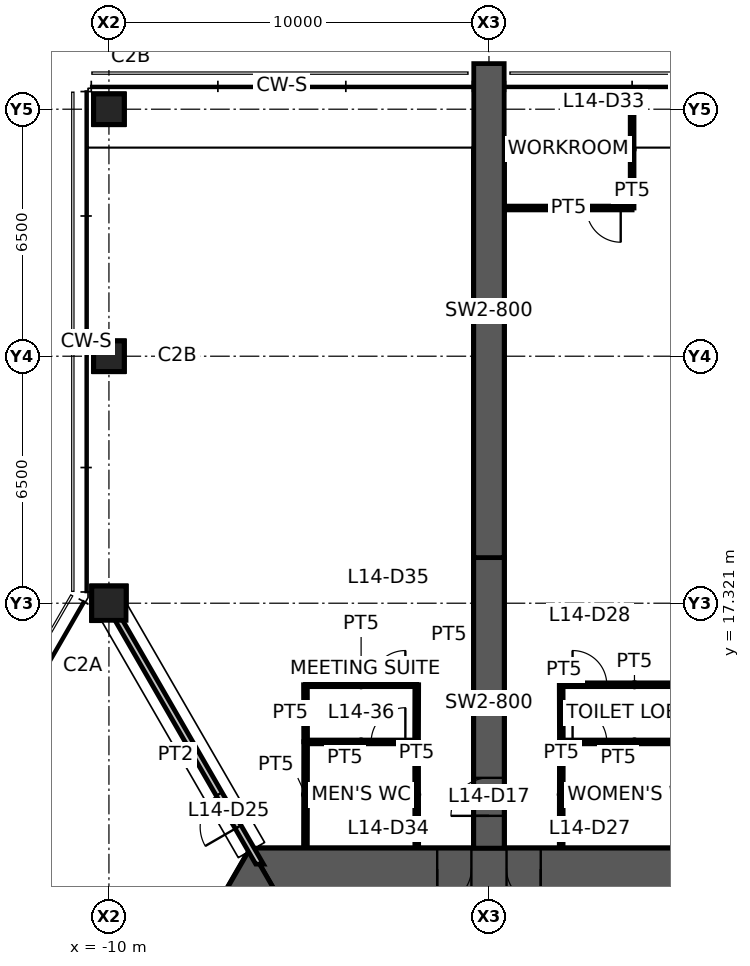
"""IFC4 building model, lengths in metres.
Left out: names, types, materials, properties, quantities, classifications, styles, units other than length and angle.
Written with IfcOpenShell. Run it as: python <this file> out.ifc"""

import sys

from ifc_helpers import new_model, si_unit, direction, frame, frame_2d, origin, origin_2d, place, context, subcontext, project, spatial, polyline, rectangle, hollow_rectangle, outline, extrude, element, fill, save


model = new_model("IFC4")
c1 = context("Model", 3, precision=1e-05, world=origin(), true_north=direction((0.0, 1.0)))
c2 = subcontext(c1, "Body", "Model", "MODEL_VIEW")
j1 = project(units=[si_unit("LENGTHUNIT", "METRE"), si_unit("PLANEANGLEUNIT", "RADIAN")], contexts=[c1])
p1 = place(None, origin())
s1 = spatial("IfcSite", under=j1, at=p1, CompositionType="ELEMENT")
p2 = place(p1, origin())
s2 = spatial("IfcBuilding", under=s1, at=p2, CompositionType="ELEMENT")
p3 = place(p2, frame((0.0, 0.0, 57.0)))
s3 = spatial("IfcBuildingStorey", under=s2, at=p3, CompositionType="ELEMENT", Elevation=57.0)
p4 = place(p3, frame((-10.0, 17.321, 0.0), z_axis=(0.0, 0.0, 1.0), x_axis=(1.0, 0.0, 0.0)))
e1 = element("IfcColumn", 1, at=p4, inside=s3, PredefinedType="COLUMN", context=c2, shape_type="SweptSolid", body=[
    extrude(hollow_rectangle(XDim=0.9, YDim=0.9, WallThickness=0.055, at=origin_2d()), origin(), (0.0, 0.0, 1.0), 4.2),
])
for number, where, z_axis, x_axis in (
    (2, (-10.0, 23.821, 0.0), (0.0, 0.0, 1.0), (1.0, 0.0, 0.0)),
    (3, (-10.0, 30.321, 0.0), (0.0, 0.0, 1.0), (1.0, 0.0, 0.0)),
):
    element("IfcColumn", number, at=place(p3, frame(where, z_axis=z_axis, x_axis=x_axis)), inside=s3, PredefinedType="COLUMN", context=c2, shape_type="SweptSolid", body=[
        extrude(hollow_rectangle(XDim=0.8, YDim=0.8, WallThickness=0.045, at=origin_2d()), origin(), (0.0, 0.0, 1.0), 4.2),
    ])
p5 = place(p3, frame((5.961, 10.325, 0.0), z_axis=(0.0, 0.0, 1.0), x_axis=(-1.0, 0.0, 0.0)))
e4 = element("IfcWall", 4, at=p5, inside=s3, PredefinedType="SHEAR", context=c2, shape_type="SweptSolid", body=[
    extrude(outline(polyline([(-0.318, -0.55), (4.599, -0.55), (5.499, -0.55), (6.424, -0.55), (7.323, -0.55), (12.24, -0.55), (11.605, 0.55), (7.323, 0.55), (6.424, 0.55), (5.499, 0.55), (4.599, 0.55), (0.318, 0.55), (-0.318, -0.55)])), origin(), (0.0, 0.0, 1.0), 4.2),
])
p6 = place(p5, frame((6.424, 0.0, 0.0)))
e5 = element("IfcOpeningElement", 5, at=p6, cuts=e4, PredefinedType="OPENING", context=c2, shape_type="SweptSolid", body=[
    extrude(rectangle(XDim=0.9, YDim=2.1, at=frame_2d((0.45, 1.05))), frame((0.0, 0.56, 0.0), z_axis=(0.0, -1.0, 0.0), x_axis=(1.0, 0.0, 0.0)), (0.0, 0.0, 1.0), 1.12),
])
p7 = place(p5, frame((4.599, 0.0, 0.0)))
e6 = element("IfcOpeningElement", 6, at=p7, cuts=e4, PredefinedType="OPENING", context=c2, shape_type="SweptSolid", body=[
    extrude(rectangle(XDim=0.9, YDim=2.1, at=frame_2d((0.45, 1.05))), frame((0.0, 0.56, 0.0), z_axis=(0.0, -1.0, 0.0), x_axis=(1.0, 0.0, 0.0)), (0.0, 0.0, 1.0), 1.12),
])
p8 = place(p3, frame((-5.961, 10.325, 0.0), z_axis=(0.0, 0.0, 1.0), x_axis=(-0.500004296715, -0.866022923061, 0.0)))
e7 = element("IfcWall", 7, at=p8, inside=s3, PredefinedType="SHEAR", context=c2, shape_type="SweptSolid", body=[
    extrude(outline(polyline([(-0.318, -0.55), (4.494, -0.55), (5.494, -0.55), (12.24, -0.55), (11.605, 0.55), (5.494, 0.55), (4.494, 0.55), (0.318, 0.55), (-0.318, -0.55)])), origin(), (0.0, 0.0, 1.0), 4.2),
])
p9 = place(p8, frame((4.494, 0.0, 0.0)))
e8 = element("IfcOpeningElement", 8, at=p9, cuts=e7, PredefinedType="OPENING", context=c2, shape_type="SweptSolid", body=[
    extrude(rectangle(XDim=1.0, YDim=2.1, at=frame_2d((0.5, 1.05))), frame((0.0, 0.56, 0.0), z_axis=(0.0, -1.0, 0.0), x_axis=(1.0, 0.0, 0.0)), (0.0, 0.0, 1.0), 1.12),
])
p10 = place(p3, frame((0.0, 10.875, 0.0), z_axis=(0.0, 0.0, 1.0), x_axis=(0.0, 1.0, 0.0)))
e9 = element("IfcWall", 9, at=p10, inside=s3, PredefinedType="SHEAR", context=c2, shape_type="SweptSolid", body=[
    extrude(rectangle(XDim=7.646, YDim=0.8, at=frame_2d((3.823, 0.0))), origin(), (0.0, 0.0, 1.0), 4.2),
])
p11 = place(p10, frame((0.85, 0.0, 0.0)))
e10 = element("IfcOpeningElement", 10, at=p11, cuts=e9, PredefinedType="OPENING", context=c2, shape_type="SweptSolid", body=[
    extrude(rectangle(XDim=1.0, YDim=2.1, at=frame_2d((0.5, 1.05))), frame((0.0, 0.41, 0.0), z_axis=(0.0, -1.0, 0.0), x_axis=(1.0, 0.0, 0.0)), (0.0, 0.0, 1.0), 0.82),
])
p12 = place(p3, frame((0.0, 18.521, 0.0), z_axis=(0.0, 0.0, 1.0), x_axis=(0.0, 1.0, 0.0)))
e11 = element("IfcWall", 11, at=p12, inside=s3, PredefinedType="SHEAR", context=c2, shape_type="SweptSolid", body=[
    extrude(rectangle(XDim=13.0, YDim=0.8, at=frame_2d((6.5, 0.0))), origin(), (0.0, 0.0, 1.0), 4.2),
])
p13 = place(p3, frame((-6.036, 10.455, 0.0), z_axis=(0.0, 0.0, 1.0), x_axis=(-0.500007693191, 0.866020962073, 0.0)))
e12 = element("IfcWall", 12, at=p13, inside=s3, PredefinedType="PARTITIONING", context=c2, shape_type="SweptSolid", body=[
    extrude(outline(polyline([(-0.051, -0.087), (1.127, -0.087), (2.127, -0.087), (7.928, -0.087), (7.928, 0.087), (2.127, 0.087), (1.127, 0.087), (0.051, 0.087), (-0.051, -0.087)])), origin(), (0.0, 0.0, 1.0), 3.35),
])
p14 = place(p13, frame((1.127, 0.0, 0.0)))
e13 = element("IfcOpeningElement", 13, at=p14, cuts=e12, PredefinedType="OPENING", context=c2, shape_type="SweptSolid", body=[
    extrude(rectangle(XDim=1.0, YDim=2.1, at=frame_2d((0.5, 1.05))), frame((0.0, 0.098, 0.0), z_axis=(0.0, -1.0, 0.0), x_axis=(1.0, 0.0, 0.0)), (0.0, 0.0, 1.0), 0.195),
])
p15 = place(p3, frame((1.9, 13.67, 0.0), z_axis=(0.0, 0.0, 1.0), x_axis=(1.0, 0.0, 0.0)))
e14 = element("IfcWall", 14, at=p15, inside=s3, PredefinedType="PARTITIONING", context=c2, shape_type="SweptSolid", body=[
    extrude(rectangle(XDim=3.857, YDim=0.1, at=frame_2d((1.929, 0.0))), origin(), (0.0, 0.0, 1.0), 3.25),
])
p16 = place(p15, frame((0.3, 0.0, 0.0)))
e15 = element("IfcOpeningElement", 15, at=p16, cuts=e14, PredefinedType="OPENING", context=c2, shape_type="SweptSolid", body=[
    extrude(rectangle(XDim=0.9, YDim=2.1, at=frame_2d((0.45, 1.05))), frame((0.0, 0.06, 0.0), z_axis=(0.0, -1.0, 0.0), x_axis=(1.0, 0.0, 0.0)), (0.0, 0.0, 1.0), 0.12),
])
p17 = place(p3, frame((1.9, 10.895, 0.0), z_axis=(0.0, 0.0, 1.0), x_axis=(0.001668567099, 0.999998607941, 0.0)))
e16 = element("IfcWall", 16, at=p17, inside=s3, PredefinedType="PARTITIONING", context=c2, shape_type="SweptSolid", body=[
    extrude(rectangle(XDim=2.78, YDim=0.1, at=frame_2d((1.39, 0.0))), origin(), (0.0, 0.0, 1.0), 3.25),
])
p18 = place(p3, frame((1.9, 15.175, 0.0), z_axis=(0.0, 0.0, 1.0), x_axis=(1.0, 0.0, 0.0)))
e17 = element("IfcWall", 17, at=p18, inside=s3, PredefinedType="PARTITIONING", context=c2, shape_type="SweptSolid", body=[
    extrude(rectangle(XDim=3.857, YDim=0.1, at=frame_2d((1.929, 0.0))), origin(), (0.0, 0.0, 1.0), 3.25),
])
p19 = place(p18, frame((0.3, 0.0, 0.0)))
e18 = element("IfcOpeningElement", 18, at=p19, cuts=e17, PredefinedType="OPENING", context=c2, shape_type="SweptSolid", body=[
    extrude(rectangle(XDim=0.9, YDim=2.1, at=frame_2d((0.45, 1.05))), frame((0.0, 0.06, 0.0), z_axis=(0.0, -1.0, 0.0), x_axis=(1.0, 0.0, 0.0)), (0.0, 0.0, 1.0), 0.12),
])
p20 = place(p3, frame((1.905, 13.675, 0.0), z_axis=(0.0, 0.0, 1.0), x_axis=(-0.00309243313, 0.999995218417, 0.0)))
e19 = element("IfcWall", 19, at=p20, inside=s3, PredefinedType="PARTITIONING", context=c2, shape_type="SweptSolid", body=[
    extrude(rectangle(XDim=1.5, YDim=0.1, at=frame_2d((0.75, 0.0))), origin(), (0.0, 0.0, 1.0), 3.25),
])
p21 = place(p3, frame((3.767, 27.72, 0.0), z_axis=(0.0, 0.0, 1.0), x_axis=(-1.0, 0.0, 0.0)))
e20 = element("IfcWall", 20, at=p21, inside=s3, PredefinedType="PARTITIONING", context=c2, shape_type="SweptSolid", body=[
    extrude(rectangle(XDim=3.347, YDim=0.1, at=frame_2d((1.673, 0.0))), origin(), (0.0, 0.0, 1.0), 3.25),
])
p22 = place(p21, frame((0.3, 0.0, 0.0)))
e21 = element("IfcOpeningElement", 21, at=p22, cuts=e20, PredefinedType="OPENING", context=c2, shape_type="SweptSolid", body=[
    extrude(rectangle(XDim=0.9, YDim=2.1, at=frame_2d((0.45, 1.05))), frame((0.0, 0.06, 0.0), z_axis=(0.0, -1.0, 0.0), x_axis=(1.0, 0.0, 0.0)), (0.0, 0.0, 1.0), 0.12),
])
p23 = place(p3, frame((3.767, 30.801, 0.0), z_axis=(0.0, 0.0, 1.0), x_axis=(0.0, -1.0, 0.0)))
e22 = element("IfcWall", 22, at=p23, inside=s3, PredefinedType="PARTITIONING", context=c2, shape_type="SweptSolid", body=[
    extrude(rectangle(XDim=3.08, YDim=0.1, at=frame_2d((1.54, 0.0))), origin(), (0.0, 0.0, 1.0), 3.25),
])
p24 = place(p3, frame((-4.829, 13.67, 0.0), z_axis=(0.0, 0.0, 1.0), x_axis=(1.0, 0.0, 0.0)))
e23 = element("IfcWall", 23, at=p24, inside=s3, PredefinedType="PARTITIONING", context=c2, shape_type="SweptSolid", body=[
    extrude(rectangle(XDim=2.929, YDim=0.1, at=frame_2d((1.465, 0.0))), origin(), (0.0, 0.0, 1.0), 3.25),
])
p25 = place(p24, frame((1.729, 0.0, 0.0)))
e24 = element("IfcOpeningElement", 24, at=p25, cuts=e23, PredefinedType="OPENING", context=c2, shape_type="SweptSolid", body=[
    extrude(rectangle(XDim=0.9, YDim=2.1, at=frame_2d((0.45, 1.05))), frame((0.0, 0.06, 0.0), z_axis=(0.0, -1.0, 0.0), x_axis=(1.0, 0.0, 0.0)), (0.0, 0.0, 1.0), 0.12),
])
for number, where, z_axis, x_axis in (
    (25, (-4.829, 10.895, 0.0), (0.0, 0.0, 1.0), (0.002, 1.0, 0.0)),
    (26, (-1.905, 13.675, 0.0), (0.0, 0.0, 1.0), (0.002, -1.0, 0.0)),
):
    element("IfcWall", number, at=place(p3, frame(where, z_axis=z_axis, x_axis=x_axis)), inside=s3, PredefinedType="PARTITIONING", context=c2, shape_type="SweptSolid", body=[
        extrude(rectangle(XDim=2.78, YDim=0.1, at=frame_2d((1.39, 0.0))), origin(), (0.0, 0.0, 1.0), 3.25),
    ])
p26 = place(p3, frame((-4.829, 15.175, 0.0), z_axis=(0.0, 0.0, 1.0), x_axis=(1.0, 0.0, 0.0)))
e27 = element("IfcWall", 27, at=p26, inside=s3, PredefinedType="PARTITIONING", context=c2, shape_type="SweptSolid", body=[
    extrude(rectangle(XDim=2.929, YDim=0.1, at=frame_2d((1.465, 0.0))), origin(), (0.0, 0.0, 1.0), 3.25),
])
p27 = place(p26, frame((1.729, 0.0, 0.0)))
e28 = element("IfcOpeningElement", 28, at=p27, cuts=e27, PredefinedType="OPENING", context=c2, shape_type="SweptSolid", body=[
    extrude(rectangle(XDim=0.9, YDim=2.1, at=frame_2d((0.45, 1.05))), frame((0.0, 0.06, 0.0), z_axis=(0.0, -1.0, 0.0), x_axis=(1.0, 0.0, 0.0)), (0.0, 0.0, 1.0), 0.12),
])
for number, where, z_axis, x_axis in (
    (29, (-4.824, 13.675, 0.0), (0.0, 0.0, 1.0), (-0.003, 1.0, 0.0)),
    (30, (-1.9, 15.175, 0.0), (0.0, 0.0, 1.0), (-0.003, -1.0, 0.0)),
):
    element("IfcWall", number, at=place(p3, frame(where, z_axis=z_axis, x_axis=x_axis)), inside=s3, PredefinedType="PARTITIONING", context=c2, shape_type="SweptSolid", body=[
        extrude(rectangle(XDim=1.5, YDim=0.1, at=frame_2d((0.75, 0.0))), origin(), (0.0, 0.0, 1.0), 3.25),
    ])
p28 = place(p6, origin())
e31 = element("IfcDoor", 31, at=p28, inside=s3, OperationType="SINGLE_SWING_RIGHT", PredefinedType="DOOR", context=c2, shape_type="SweptSolid", body=[
    extrude(rectangle(XDim=0.9, YDim=2.1, at=frame_2d((0.45, 1.05))), frame((0.0, 0.025, 0.0), z_axis=(0.0, -1.0, 0.0), x_axis=(1.0, 0.0, 0.0)), (0.0, 0.0, 1.0), 0.05),
])
fill(e5, e31)
p29 = place(p7, origin())
e32 = element("IfcDoor", 32, at=p29, inside=s3, OperationType="SINGLE_SWING_LEFT", PredefinedType="DOOR", context=c2, shape_type="SweptSolid", body=[
    extrude(rectangle(XDim=0.9, YDim=2.1, at=frame_2d((0.45, 1.05))), frame((0.0, 0.025, 0.0), z_axis=(0.0, -1.0, 0.0), x_axis=(1.0, 0.0, 0.0)), (0.0, 0.0, 1.0), 0.05),
])
fill(e6, e32)
p30 = place(p11, origin())
e33 = element("IfcDoor", 33, at=p30, inside=s3, OperationType="SINGLE_SWING_LEFT", PredefinedType="DOOR", context=c2, shape_type="SweptSolid", body=[
    extrude(rectangle(XDim=1.0, YDim=2.1, at=frame_2d((0.5, 1.05))), frame((0.0, 0.025, 0.0), z_axis=(0.0, -1.0, 0.0), x_axis=(1.0, 0.0, 0.0)), (0.0, 0.0, 1.0), 0.05),
])
fill(e10, e33)
p31 = place(p14, origin())
e34 = element("IfcDoor", 34, at=p31, inside=s3, OperationType="SINGLE_SWING_LEFT", PredefinedType="DOOR", context=c2, shape_type="SweptSolid", body=[
    extrude(rectangle(XDim=1.0, YDim=2.1, at=frame_2d((0.5, 1.05))), frame((0.0, 0.025, 0.0), z_axis=(0.0, -1.0, 0.0), x_axis=(1.0, 0.0, 0.0)), (0.0, 0.0, 1.0), 0.05),
])
fill(e13, e34)
p32 = place(p16, origin())
e35 = element("IfcDoor", 35, at=p32, inside=s3, OperationType="SINGLE_SWING_LEFT", PredefinedType="DOOR", context=c2, shape_type="SweptSolid", body=[
    extrude(rectangle(XDim=0.9, YDim=2.1, at=frame_2d((0.45, 1.05))), frame((0.0, 0.025, 0.0), z_axis=(0.0, -1.0, 0.0), x_axis=(1.0, 0.0, 0.0)), (0.0, 0.0, 1.0), 0.05),
])
fill(e15, e35)
p33 = place(p19, origin())
e36 = element("IfcDoor", 36, at=p33, inside=s3, OperationType="SINGLE_SWING_LEFT", PredefinedType="DOOR", context=c2, shape_type="SweptSolid", body=[
    extrude(rectangle(XDim=0.9, YDim=2.1, at=frame_2d((0.45, 1.05))), frame((0.0, 0.025, 0.0), z_axis=(0.0, -1.0, 0.0), x_axis=(1.0, 0.0, 0.0)), (0.0, 0.0, 1.0), 0.05),
])
fill(e18, e36)
p34 = place(p22, origin())
e37 = element("IfcDoor", 37, at=p34, inside=s3, OperationType="SINGLE_SWING_LEFT", PredefinedType="DOOR", context=c2, shape_type="SweptSolid", body=[
    extrude(rectangle(XDim=0.9, YDim=2.1, at=frame_2d((0.45, 1.05))), frame((0.0, 0.025, 0.0), z_axis=(0.0, -1.0, 0.0), x_axis=(1.0, 0.0, 0.0)), (0.0, 0.0, 1.0), 0.05),
])
fill(e21, e37)
p35 = place(p25, origin())
e38 = element("IfcDoor", 38, at=p35, inside=s3, OperationType="SINGLE_SWING_RIGHT", PredefinedType="DOOR", context=c2, shape_type="SweptSolid", body=[
    extrude(rectangle(XDim=0.9, YDim=2.1, at=frame_2d((0.45, 1.05))), frame((0.0, 0.025, 0.0), z_axis=(0.0, -1.0, 0.0), x_axis=(1.0, 0.0, 0.0)), (0.0, 0.0, 1.0), 0.05),
])
fill(e24, e38)
p36 = place(p27, origin())
e39 = element("IfcDoor", 39, at=p36, inside=s3, OperationType="SINGLE_SWING_RIGHT", PredefinedType="DOOR", context=c2, shape_type="SweptSolid", body=[
    extrude(rectangle(XDim=0.9, YDim=2.1, at=frame_2d((0.45, 1.05))), frame((0.0, 0.025, 0.0), z_axis=(0.0, -1.0, 0.0), x_axis=(1.0, 0.0, 0.0)), (0.0, 0.0, 1.0), 0.05),
])
fill(e28, e39)
save(model, sys.argv[1])
